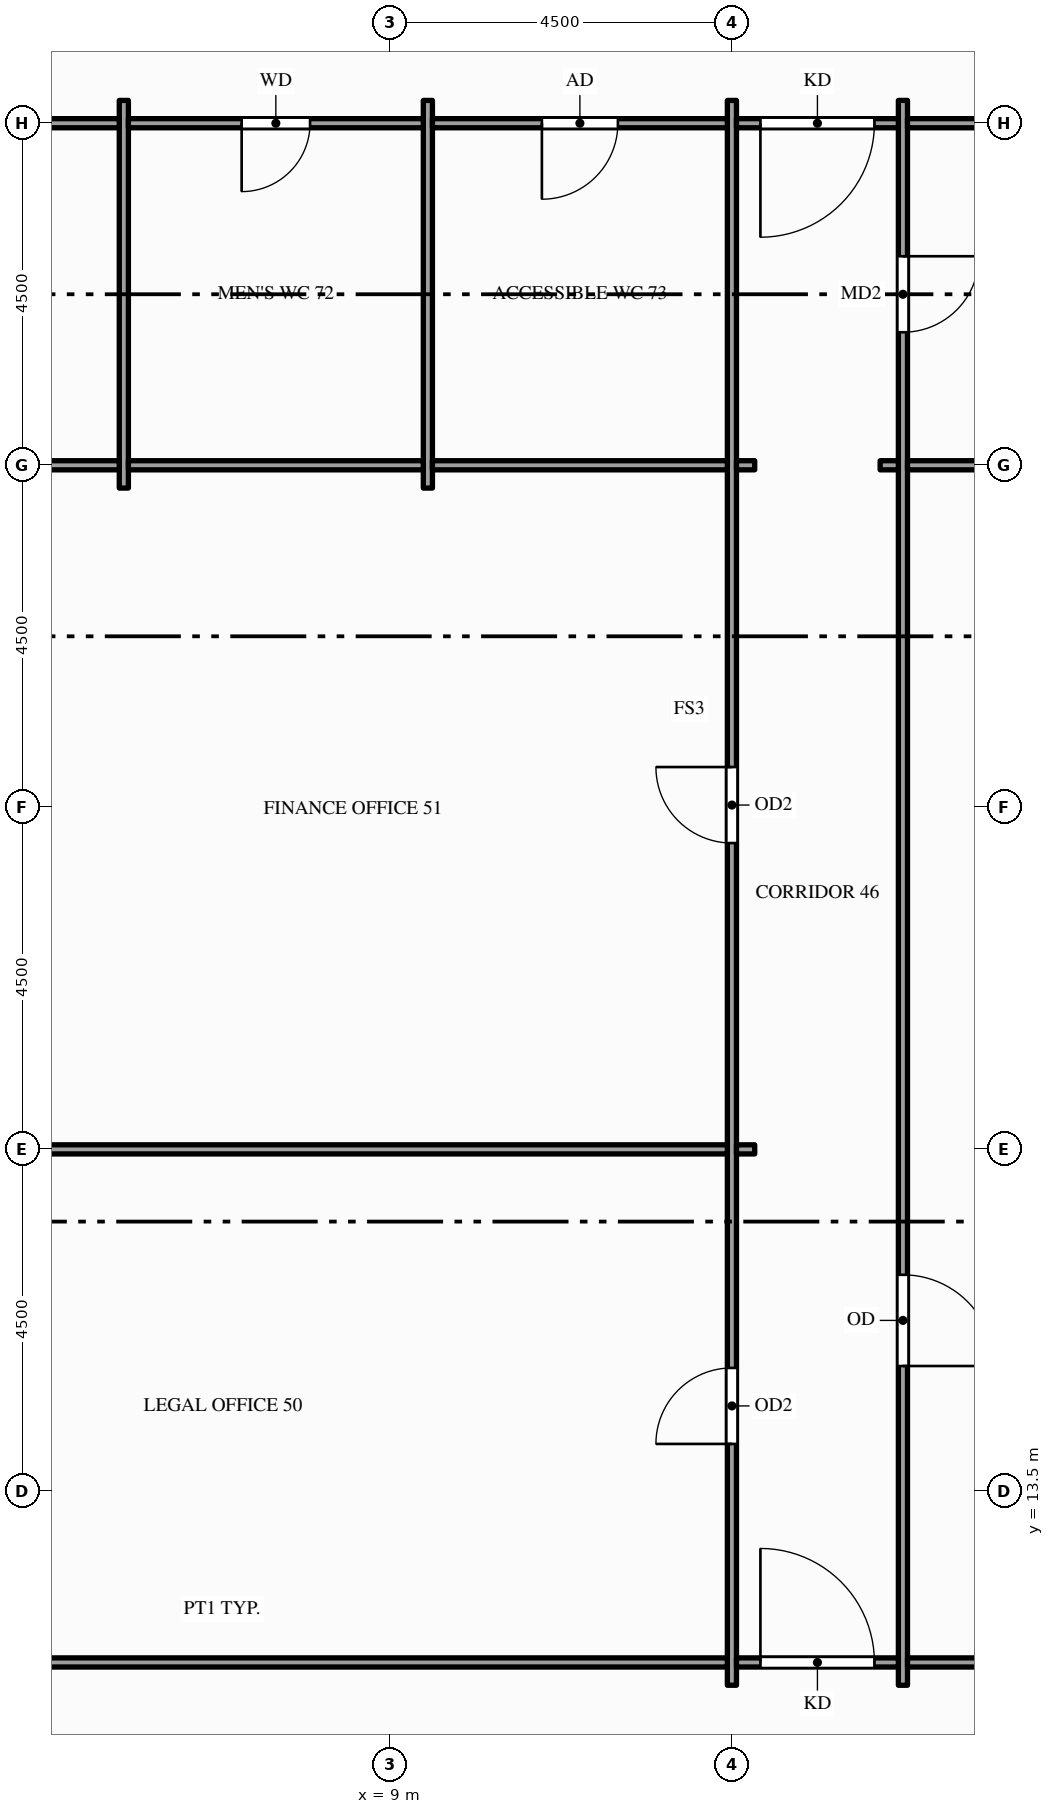
"""IFC4 building model, lengths in metres.
Left out: names, types, materials, properties, quantities, classifications, styles, units other than length and angle.
Written with IfcOpenShell. Run it as: python <this file> out.ifc"""

import sys

from ifc_helpers import new_model, si_unit, direction, frame, frame_2d, origin, place, context, subcontext, project, spatial, rectangle, extrude, element, fill, save


model = new_model("IFC4")
c1 = context("Model", 3, precision=1e-05, world=origin(), true_north=direction((0.0, 1.0)))
c2 = subcontext(c1, "Body", "Model", "MODEL_VIEW")
j1 = project(units=[si_unit("LENGTHUNIT", "METRE"), si_unit("PLANEANGLEUNIT", "RADIAN")], contexts=[c1])
p1 = place(None, origin())
s1 = spatial("IfcSite", under=j1, at=p1, CompositionType="ELEMENT")
p2 = place(p1, origin())
s2 = spatial("IfcBuilding", under=s1, at=p2, CompositionType="ELEMENT")
p3 = place(p2, frame((0.0, 0.0, 227.0)))
s3 = spatial("IfcBuildingStorey", under=s2, at=p3, CompositionType="ELEMENT", Elevation=227.0)
for number, where, z_axis, x_axis in (
    (1, (5.5, 26.7, 0.0), (0.0, 0.0, 1.0), (0.0, 1.0, 0.0)),
    (2, (9.5, 26.7, 0.0), (0.0, 0.0, 1.0), (0.0, 1.0, 0.0)),
):
    element("IfcWall", number, at=place(p3, frame(where, z_axis=z_axis, x_axis=x_axis)), inside=s3, PredefinedType="PARTITIONING", context=c2, shape_type="SweptSolid", body=[
        extrude(rectangle(XDim=5.1, YDim=0.12, at=frame_2d((2.55, 0.0))), origin(), (0.0, 0.0, 1.0), 3.85),
    ])
p4 = place(p3, frame((13.5, 10.95, 0.0), z_axis=(0.0, 0.0, 1.0), x_axis=(0.0, 1.0, 0.0)))
e3 = element("IfcWall", 3, at=p4, inside=s3, PredefinedType="PARTITIONING", context=c2, shape_type="SweptSolid", body=[
    extrude(rectangle(XDim=20.85, YDim=0.12, at=frame_2d((10.425, 0.0))), origin(), (0.0, 0.0, 1.0), 2.6),
])
p5 = place(p4, frame((3.175, 0.0, 0.0)))
e4 = element("IfcOpeningElement", 4, at=p5, cuts=e3, PredefinedType="OPENING", context=c2, shape_type="SweptSolid", body=[
    extrude(rectangle(XDim=1.0, YDim=2.1, at=frame_2d((0.5, 1.05))), frame((0.0, 0.07, 0.0), z_axis=(0.0, -1.0, 0.0), x_axis=(1.0, 0.0, 0.0)), (0.0, 0.0, 1.0), 0.14),
])
p6 = place(p4, frame((11.08, 0.0, 0.0)))
e5 = element("IfcOpeningElement", 5, at=p6, cuts=e3, PredefinedType="OPENING", context=c2, shape_type="SweptSolid", body=[
    extrude(rectangle(XDim=1.0, YDim=2.1, at=frame_2d((0.5, 1.05))), frame((0.0, 0.07, 0.0), z_axis=(0.0, -1.0, 0.0), x_axis=(1.0, 0.0, 0.0)), (0.0, 0.0, 1.0), 0.14),
])
p7 = place(p3, frame((15.75, 10.95, 0.0), z_axis=(0.0, 0.0, 1.0), x_axis=(0.0, 1.0, 0.0)))
e6 = element("IfcWall", 6, at=p7, inside=s3, PredefinedType="PARTITIONING", context=c2, shape_type="SweptSolid", body=[
    extrude(rectangle(XDim=20.85, YDim=0.12, at=frame_2d((10.425, 0.0))), origin(), (0.0, 0.0, 1.0), 2.6),
])
p8 = place(p7, frame((17.8, 0.0, 0.0)))
e7 = element("IfcOpeningElement", 7, at=p8, cuts=e6, PredefinedType="OPENING", context=c2, shape_type="SweptSolid", body=[
    extrude(rectangle(XDim=1.0, YDim=2.1, at=frame_2d((0.5, 1.05))), frame((0.0, 0.07, 0.0), z_axis=(0.0, -1.0, 0.0), x_axis=(1.0, 0.0, 0.0)), (0.0, 0.0, 1.0), 0.14),
])
p9 = place(p7, frame((4.2, 0.0, 0.0)))
e8 = element("IfcOpeningElement", 8, at=p9, cuts=e6, PredefinedType="OPENING", context=c2, shape_type="SweptSolid", body=[
    extrude(rectangle(XDim=1.2, YDim=2.1, at=frame_2d((0.6, 1.05))), frame((0.0, 0.07, 0.0), z_axis=(0.0, -1.0, 0.0), x_axis=(1.0, 0.0, 0.0)), (0.0, 0.0, 1.0), 0.14),
])
p10 = place(p3, frame((0.15, 11.25, 0.0), z_axis=(0.0, 0.0, 1.0), x_axis=(1.0, 0.0, 0.0)))
e9 = element("IfcWall", 9, at=p10, inside=s3, PredefinedType="PARTITIONING", context=c2, shape_type="SweptSolid", body=[
    extrude(rectangle(XDim=13.29, YDim=0.12, at=frame_2d((6.645, 0.0))), origin(), (0.0, 0.0, 1.0), 2.87),
])
p11 = place(p3, frame((13.56, 11.25, 0.0), z_axis=(0.0, 0.0, 1.0), x_axis=(1.0, 0.0, 0.0)))
e10 = element("IfcWall", 10, at=p11, inside=s3, PredefinedType="PARTITIONING", context=c2, shape_type="SweptSolid", body=[
    extrude(rectangle(XDim=2.13, YDim=0.12, at=frame_2d((1.065, 0.0))), origin(), (0.0, 0.0, 1.0), 2.87),
])
p12 = place(p11, frame((0.315, 0.0, 0.0)))
e11 = element("IfcOpeningElement", 11, at=p12, cuts=e10, PredefinedType="OPENING", context=c2, shape_type="SweptSolid", body=[
    extrude(rectangle(XDim=1.5, YDim=2.1, at=frame_2d((0.75, 1.05))), frame((0.0, 0.07, 0.0), z_axis=(0.0, -1.0, 0.0), x_axis=(1.0, 0.0, 0.0)), (0.0, 0.0, 1.0), 0.14),
])
p13 = place(p3, frame((15.81, 11.25, 0.0), z_axis=(0.0, 0.0, 1.0), x_axis=(1.0, 0.0, 0.0)))
e12 = element("IfcWall", 12, at=p13, inside=s3, PredefinedType="PARTITIONING", context=c2, shape_type="SweptSolid", body=[
    extrude(rectangle(XDim=11.13, YDim=0.12, at=frame_2d((5.565, 0.0))), origin(), (0.0, 0.0, 1.0), 2.76),
])
p14 = place(p13, frame((3.54, 0.0, 0.0)))
e13 = element("IfcOpeningElement", 13, at=p14, cuts=e12, PredefinedType="OPENING", context=c2, shape_type="SweptSolid", body=[
    extrude(rectangle(XDim=1.8, YDim=2.1, at=frame_2d((0.9, 1.05))), frame((0.0, 0.07, 0.0), z_axis=(0.0, -1.0, 0.0), x_axis=(1.0, 0.0, 0.0)), (0.0, 0.0, 1.0), 0.14),
])
p15 = place(p3, frame((0.15, 18.0, 0.0), z_axis=(0.0, 0.0, 1.0), x_axis=(1.0, 0.0, 0.0)))
e14 = element("IfcWall", 14, at=p15, inside=s3, PredefinedType="PARTITIONING", context=c2, shape_type="SweptSolid", body=[
    extrude(rectangle(XDim=13.29, YDim=0.12, at=frame_2d((6.645, 0.0))), origin(), (0.0, 0.0, 1.0), 2.87),
])
p16 = place(p3, frame((13.56, 18.0, 0.0), z_axis=(0.0, 0.0, 1.0), x_axis=(1.0, 0.0, 0.0)))
e15 = element("IfcWall", 15, at=p16, inside=s3, PredefinedType="PARTITIONING", context=c2, shape_type="SweptSolid", body=[
    extrude(rectangle(XDim=0.24, YDim=0.12, at=frame_2d((0.12, 0.0))), origin(), (0.0, 0.0, 1.0), 2.87),
])
p17 = place(p3, frame((1.65, 27.0, 0.0), z_axis=(0.0, 0.0, 1.0), x_axis=(1.0, 0.0, 0.0)))
e16 = element("IfcWall", 16, at=p17, inside=s3, PredefinedType="PARTITIONING", context=c2, shape_type="SweptSolid", body=[
    extrude(rectangle(XDim=3.79, YDim=0.12, at=frame_2d((1.895, 0.0))), origin(), (0.0, 0.0, 1.0), 2.87),
])
for number, where, z_axis, x_axis in (
    (17, (5.56, 27.0, 0.0), (0.0, 0.0, 1.0), (1.0, 0.0, 0.0)),
    (18, (9.56, 27.0, 0.0), (0.0, 0.0, 1.0), (1.0, 0.0, 0.0)),
):
    element("IfcWall", number, at=place(p3, frame(where, z_axis=z_axis, x_axis=x_axis)), inside=s3, PredefinedType="PARTITIONING", context=c2, shape_type="SweptSolid", body=[
        extrude(rectangle(XDim=3.88, YDim=0.12, at=frame_2d((1.94, 0.0))), origin(), (0.0, 0.0, 1.0), 2.87),
    ])
for number, where, z_axis, x_axis in (
    (19, (13.56, 27.0, 0.0), (0.0, 0.0, 1.0), (1.0, 0.0, 0.0)),
    (20, (15.45, 27.0, 0.0), (0.0, 0.0, 1.0), (1.0, 0.0, 0.0)),
):
    element("IfcWall", number, at=place(p3, frame(where, z_axis=z_axis, x_axis=x_axis)), inside=s3, PredefinedType="PARTITIONING", context=c2, shape_type="SweptSolid", body=[
        extrude(rectangle(XDim=0.24, YDim=0.12, at=frame_2d((0.12, 0.0))), origin(), (0.0, 0.0, 1.0), 2.87),
    ])
p18 = place(p3, frame((15.81, 27.0, 0.0), z_axis=(0.0, 0.0, 1.0), x_axis=(1.0, 0.0, 0.0)))
e21 = element("IfcWall", 21, at=p18, inside=s3, PredefinedType="PARTITIONING", context=c2, shape_type="SweptSolid", body=[
    extrude(rectangle(XDim=8.04, YDim=0.12, at=frame_2d((4.02, 0.0))), origin(), (0.0, 0.0, 1.0), 2.87),
])
p19 = place(p3, frame((1.65, 31.5, 0.0), z_axis=(0.0, 0.0, 1.0), x_axis=(1.0, 0.0, 0.0)))
e22 = element("IfcWall", 22, at=p19, inside=s3, PredefinedType="PARTITIONING", context=c2, shape_type="SweptSolid", body=[
    extrude(rectangle(XDim=3.79, YDim=0.12, at=frame_2d((1.895, 0.0))), origin(), (0.0, 0.0, 1.0), 2.87),
])
p20 = place(p19, frame((0.85, 0.0, 0.0)))
e23 = element("IfcOpeningElement", 23, at=p20, cuts=e22, PredefinedType="OPENING", context=c2, shape_type="SweptSolid", body=[
    extrude(rectangle(XDim=0.9, YDim=2.1, at=frame_2d((0.45, 1.05))), frame((0.0, 0.07, 0.0), z_axis=(0.0, -1.0, 0.0), x_axis=(1.0, 0.0, 0.0)), (0.0, 0.0, 1.0), 0.14),
])
p21 = place(p3, frame((5.56, 31.5, 0.0), z_axis=(0.0, 0.0, 1.0), x_axis=(1.0, 0.0, 0.0)))
e24 = element("IfcWall", 24, at=p21, inside=s3, PredefinedType="PARTITIONING", context=c2, shape_type="SweptSolid", body=[
    extrude(rectangle(XDim=3.88, YDim=0.12, at=frame_2d((1.94, 0.0))), origin(), (0.0, 0.0, 1.0), 2.87),
])
p22 = place(p21, frame((1.49, 0.0, 0.0)))
e25 = element("IfcOpeningElement", 25, at=p22, cuts=e24, PredefinedType="OPENING", context=c2, shape_type="SweptSolid", body=[
    extrude(rectangle(XDim=0.9, YDim=2.1, at=frame_2d((0.45, 1.05))), frame((0.0, 0.07, 0.0), z_axis=(0.0, -1.0, 0.0), x_axis=(1.0, 0.0, 0.0)), (0.0, 0.0, 1.0), 0.14),
])
p23 = place(p3, frame((9.56, 31.5, 0.0), z_axis=(0.0, 0.0, 1.0), x_axis=(1.0, 0.0, 0.0)))
e26 = element("IfcWall", 26, at=p23, inside=s3, PredefinedType="PARTITIONING", context=c2, shape_type="SweptSolid", body=[
    extrude(rectangle(XDim=3.88, YDim=0.12, at=frame_2d((1.94, 0.0))), origin(), (0.0, 0.0, 1.0), 2.87),
])
p24 = place(p23, frame((1.44, 0.0, 0.0)))
e27 = element("IfcOpeningElement", 27, at=p24, cuts=e26, PredefinedType="OPENING", context=c2, shape_type="SweptSolid", body=[
    extrude(rectangle(XDim=1.0, YDim=2.1, at=frame_2d((0.5, 1.05))), frame((0.0, 0.07, 0.0), z_axis=(0.0, -1.0, 0.0), x_axis=(1.0, 0.0, 0.0)), (0.0, 0.0, 1.0), 0.14),
])
p25 = place(p3, frame((13.56, 31.5, 0.0), z_axis=(0.0, 0.0, 1.0), x_axis=(1.0, 0.0, 0.0)))
e28 = element("IfcWall", 28, at=p25, inside=s3, PredefinedType="PARTITIONING", context=c2, shape_type="SweptSolid", body=[
    extrude(rectangle(XDim=2.13, YDim=0.12, at=frame_2d((1.065, 0.0))), origin(), (0.0, 0.0, 1.0), 2.87),
])
p26 = place(p25, frame((0.315, 0.0, 0.0)))
e29 = element("IfcOpeningElement", 29, at=p26, cuts=e28, PredefinedType="OPENING", context=c2, shape_type="SweptSolid", body=[
    extrude(rectangle(XDim=1.5, YDim=2.1, at=frame_2d((0.75, 1.05))), frame((0.0, 0.07, 0.0), z_axis=(0.0, -1.0, 0.0), x_axis=(1.0, 0.0, 0.0)), (0.0, 0.0, 1.0), 0.14),
])
p27 = place(p3, frame((15.81, 31.5, 0.0), z_axis=(0.0, 0.0, 1.0), x_axis=(1.0, 0.0, 0.0)))
e30 = element("IfcWall", 30, at=p27, inside=s3, PredefinedType="PARTITIONING", context=c2, shape_type="SweptSolid", body=[
    extrude(rectangle(XDim=8.04, YDim=0.12, at=frame_2d((4.02, 0.0))), origin(), (0.0, 0.0, 1.0), 2.87),
])
p28 = place(p12, origin())
e31 = element("IfcDoor", 31, at=p28, inside=s3, OperationType="SINGLE_SWING_LEFT", PredefinedType="DOOR", context=c2, shape_type="SweptSolid", body=[
    extrude(rectangle(XDim=1.5, YDim=2.1, at=frame_2d((0.75, 1.05))), frame((0.0, 0.025, 0.0), z_axis=(0.0, -1.0, 0.0), x_axis=(1.0, 0.0, 0.0)), (0.0, 0.0, 1.0), 0.05),
])
fill(e11, e31)
p29 = place(p26, origin())
e32 = element("IfcDoor", 32, at=p29, inside=s3, OperationType="SINGLE_SWING_LEFT", PredefinedType="DOOR", context=c2, shape_type="SweptSolid", body=[
    extrude(rectangle(XDim=1.5, YDim=2.1, at=frame_2d((0.75, 1.05))), frame((0.0, 0.025, 0.0), z_axis=(0.0, -1.0, 0.0), x_axis=(1.0, 0.0, 0.0)), (0.0, 0.0, 1.0), 0.05),
])
fill(e29, e32)
p30 = place(p5, origin())
e33 = element("IfcDoor", 33, at=p30, inside=s3, OperationType="SINGLE_SWING_LEFT", PredefinedType="DOOR", context=c2, shape_type="SweptSolid", body=[
    extrude(rectangle(XDim=1.0, YDim=2.1, at=frame_2d((0.5, 1.05))), frame((0.0, 0.025, 0.0), z_axis=(0.0, -1.0, 0.0), x_axis=(1.0, 0.0, 0.0)), (0.0, 0.0, 1.0), 0.05),
])
fill(e4, e33)
p31 = place(p6, origin())
e34 = element("IfcDoor", 34, at=p31, inside=s3, OperationType="SINGLE_SWING_RIGHT", PredefinedType="DOOR", context=c2, shape_type="SweptSolid", body=[
    extrude(rectangle(XDim=1.0, YDim=2.1, at=frame_2d((0.5, 1.05))), frame((0.0, 0.025, 0.0), z_axis=(0.0, -1.0, 0.0), x_axis=(1.0, 0.0, 0.0)), (0.0, 0.0, 1.0), 0.05),
])
fill(e5, e34)
p32 = place(p22, origin())
e35 = element("IfcDoor", 35, at=p32, inside=s3, OperationType="SINGLE_SWING_LEFT", PredefinedType="DOOR", context=c2, shape_type="SweptSolid", body=[
    extrude(rectangle(XDim=0.9, YDim=2.1, at=frame_2d((0.45, 1.05))), frame((0.0, 0.025, 0.0), z_axis=(0.0, -1.0, 0.0), x_axis=(1.0, 0.0, 0.0)), (0.0, 0.0, 1.0), 0.05),
])
fill(e25, e35)
p33 = place(p24, origin())
e36 = element("IfcDoor", 36, at=p33, inside=s3, OperationType="SINGLE_SWING_LEFT", PredefinedType="DOOR", context=c2, shape_type="SweptSolid", body=[
    extrude(rectangle(XDim=1.0, YDim=2.1, at=frame_2d((0.5, 1.05))), frame((0.0, 0.025, 0.0), z_axis=(0.0, -1.0, 0.0), x_axis=(1.0, 0.0, 0.0)), (0.0, 0.0, 1.0), 0.05),
])
fill(e27, e36)
p34 = place(p8, origin())
e37 = element("IfcDoor", 37, at=p34, inside=s3, OperationType="SINGLE_SWING_RIGHT", PredefinedType="DOOR", context=c2, shape_type="SweptSolid", body=[
    extrude(rectangle(XDim=1.0, YDim=2.1, at=frame_2d((0.5, 1.05))), frame((0.0, 0.025, 0.0), z_axis=(0.0, -1.0, 0.0), x_axis=(1.0, 0.0, 0.0)), (0.0, 0.0, 1.0), 0.05),
])
fill(e7, e37)
p35 = place(p9, origin())
e38 = element("IfcDoor", 38, at=p35, inside=s3, OperationType="SINGLE_SWING_LEFT", PredefinedType="DOOR", context=c2, shape_type="SweptSolid", body=[
    extrude(rectangle(XDim=1.2, YDim=2.1, at=frame_2d((0.6, 1.05))), frame((0.0, 0.025, 0.0), z_axis=(0.0, -1.0, 0.0), x_axis=(1.0, 0.0, 0.0)), (0.0, 0.0, 1.0), 0.05),
])
fill(e8, e38)
save(model, sys.argv[1])
